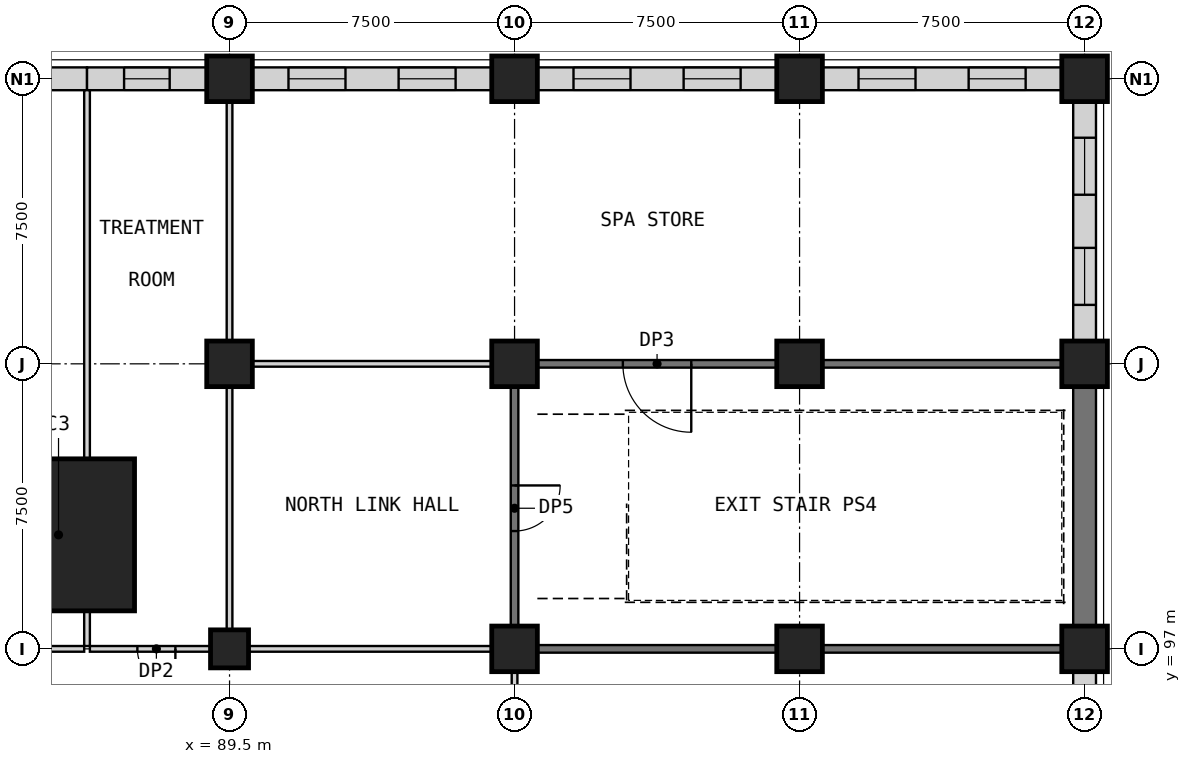
"""IFC4 building model, lengths in metres.
Left out: names, types, materials, properties, quantities, classifications, styles, units other than length and angle.
Written with IfcOpenShell. Run it as: python <this file> out.ifc"""

import sys

from ifc_helpers import new_model, si_unit, direction, frame, frame_2d, origin, origin_2d, place, context, subcontext, project, spatial, rectangle, extrude, element, fill, save


model = new_model("IFC4")
c1 = context("Model", 3, precision=1e-05, world=origin(), true_north=direction((0.0, 1.0)))
c2 = subcontext(c1, "Body", "Model", "MODEL_VIEW")
j1 = project(units=[si_unit("LENGTHUNIT", "METRE"), si_unit("PLANEANGLEUNIT", "RADIAN")], contexts=[c1])
p1 = place(None, origin())
s1 = spatial("IfcSite", under=j1, at=p1, CompositionType="ELEMENT")
p2 = place(p1, origin())
s2 = spatial("IfcBuilding", under=s1, at=p2, CompositionType="ELEMENT")
p3 = place(p2, frame((0.0, 0.0, 29.0)))
s3 = spatial("IfcBuildingStorey", under=s2, at=p3, CompositionType="ELEMENT", Elevation=29.0)
p4 = place(p3, frame((89.5, 97.0, 0.0), z_axis=(0.0, 0.0, 1.0), x_axis=(1.0, 0.0, 0.0)))
e1 = element("IfcColumn", 1, at=p4, inside=s3, PredefinedType="COLUMN", context=c2, shape_type="SweptSolid", body=[
    extrude(rectangle(XDim=1.0, YDim=1.0, at=origin_2d()), origin(), (0.0, 0.0, 1.0), 5.0),
])
p5 = place(p3, frame((85.0, 100.0, 0.0), z_axis=(0.0, 0.0, 1.0), x_axis=(1.0, 0.0, 0.0)))
e2 = element("IfcColumn", 2, at=p5, inside=s3, PredefinedType="COLUMN", context=c2, shape_type="SweptSolid", body=[
    extrude(rectangle(XDim=4.0, YDim=4.0, at=origin_2d()), origin(), (0.0, 0.0, 1.0), 5.0),
])
for number, where, z_axis, x_axis in (
    (3, (89.5, 104.5, 0.0), (0.0, 0.0, 1.0), (1.0, 0.0, 0.0)),
    (4, (89.5, 112.0, 0.0), (0.0, 0.0, 1.0), (1.0, 0.0, 0.0)),
    (5, (97.0, 97.0, 0.0), (0.0, 0.0, 1.0), (1.0, 0.0, 0.0)),
    (6, (97.0, 104.5, 0.0), (0.0, 0.0, 1.0), (1.0, 0.0, 0.0)),
    (7, (97.0, 112.0, 0.0), (0.0, 0.0, 1.0), (1.0, 0.0, 0.0)),
    (8, (104.5, 97.0, 0.0), (0.0, 0.0, 1.0), (1.0, 0.0, 0.0)),
    (9, (104.5, 104.5, 0.0), (0.0, 0.0, 1.0), (1.0, 0.0, 0.0)),
    (10, (104.5, 112.0, 0.0), (0.0, 0.0, 1.0), (1.0, 0.0, 0.0)),
    (11, (112.0, 97.0, 0.0), (0.0, 0.0, 1.0), (1.0, 0.0, 0.0)),
    (12, (112.0, 104.5, 0.0), (0.0, 0.0, 1.0), (1.0, 0.0, 0.0)),
    (13, (112.0, 112.0, 0.0), (0.0, 0.0, 1.0), (1.0, 0.0, 0.0)),
):
    element("IfcColumn", number, at=place(p3, frame(where, z_axis=z_axis, x_axis=x_axis)), inside=s3, PredefinedType="COLUMN", context=c2, shape_type="SweptSolid", body=[
        extrude(rectangle(XDim=1.2, YDim=1.2, at=origin_2d()), origin(), (0.0, 0.0, 1.0), 5.0),
    ])
p6 = place(p3, frame((82.6, 97.0, 0.0), z_axis=(0.0, 0.0, 1.0), x_axis=(1.0, 0.0, 0.0)))
e14 = element("IfcWall", 14, at=p6, inside=s3, PredefinedType="PARTITIONING", context=c2, shape_type="SweptSolid", body=[
    extrude(rectangle(XDim=3.075, YDim=0.15, at=frame_2d((1.538, 0.0))), origin(), (0.0, 0.0, 1.0), 4.7),
])
p7 = place(p3, frame((89.0, 97.0, 0.0), z_axis=(0.0, 0.0, 1.0), x_axis=(-1.0, 0.0, 0.0)))
e15 = element("IfcWall", 15, at=p7, inside=s3, PredefinedType="PARTITIONING", context=c2, shape_type="SweptSolid", body=[
    extrude(rectangle(XDim=3.175, YDim=0.15, at=frame_2d((1.587, 0.0))), origin(), (0.0, 0.0, 1.0), 4.7),
])
p8 = place(p7, frame((0.925, 0.0, 0.0)))
e16 = element("IfcOpeningElement", 16, at=p8, cuts=e15, PredefinedType="OPENING", context=c2, shape_type="SweptSolid", body=[
    extrude(rectangle(XDim=1.0, YDim=2.1, at=frame_2d((0.5, 1.05))), frame((0.0, 0.085, 0.0), z_axis=(0.0, -1.0, 0.0), x_axis=(1.0, 0.0, 0.0)), (0.0, 0.0, 1.0), 0.17),
])
p9 = place(p3, frame((90.0, 97.0, 0.0), z_axis=(0.0, 0.0, 1.0), x_axis=(1.0, 0.0, 0.0)))
e17 = element("IfcWall", 17, at=p9, inside=s3, PredefinedType="PARTITIONING", context=c2, shape_type="SweptSolid", body=[
    extrude(rectangle(XDim=6.4, YDim=0.15, at=frame_2d((3.2, 0.0))), origin(), (0.0, 0.0, 1.0), 4.7),
])
for number, where, z_axis, x_axis in (
    (18, (97.6, 97.0, 0.0), (0.0, 0.0, 1.0), (1.0, 0.0, 0.0)),
    (19, (105.1, 97.0, 0.0), (0.0, 0.0, 1.0), (1.0, 0.0, 0.0)),
):
    element("IfcWall", number, at=place(p3, frame(where, z_axis=z_axis, x_axis=x_axis)), inside=s3, PredefinedType="SHEAR", context=c2, shape_type="SweptSolid", body=[
        extrude(rectangle(XDim=6.3, YDim=0.2, at=frame_2d((3.15, 0.0))), origin(), (0.0, 0.0, 1.0), 4.7),
    ])
p10 = place(p3, frame((82.6, 112.0, 0.0), z_axis=(0.0, 0.0, 1.0), x_axis=(1.0, 0.0, 0.0)))
e20 = element("IfcWall", 20, at=p10, inside=s3, PredefinedType="PARTITIONING", context=c2, shape_type="SweptSolid", body=[
    extrude(rectangle(XDim=3.15, YDim=0.6, at=frame_2d((1.575, 0.0))), origin(), (0.0, 0.0, 1.0), 4.7),
])
p11 = place(p10, frame((0.975, 0.0, 0.9)))
e21 = element("IfcOpeningElement", 21, at=p11, cuts=e20, PredefinedType="OPENING", context=c2, shape_type="SweptSolid", body=[
    extrude(rectangle(XDim=1.2, YDim=2.8, at=frame_2d((0.6, 1.4))), frame((0.0, 0.31, 0.0), z_axis=(0.0, -1.0, 0.0), x_axis=(1.0, 0.0, 0.0)), (0.0, 0.0, 1.0), 0.62),
])
p12 = place(p3, frame((85.75, 112.0, 0.0), z_axis=(0.0, 0.0, 1.0), x_axis=(1.0, 0.0, 0.0)))
e22 = element("IfcWall", 22, at=p12, inside=s3, PredefinedType="PARTITIONING", context=c2, shape_type="SweptSolid", body=[
    extrude(rectangle(XDim=3.15, YDim=0.6, at=frame_2d((1.575, 0.0))), origin(), (0.0, 0.0, 1.0), 4.7),
])
p13 = place(p12, frame((0.975, 0.0, 0.9)))
e23 = element("IfcOpeningElement", 23, at=p13, cuts=e22, PredefinedType="OPENING", context=c2, shape_type="SweptSolid", body=[
    extrude(rectangle(XDim=1.2, YDim=2.8, at=frame_2d((0.6, 1.4))), frame((0.0, 0.31, 0.0), z_axis=(0.0, -1.0, 0.0), x_axis=(1.0, 0.0, 0.0)), (0.0, 0.0, 1.0), 0.62),
])
p14 = place(p3, frame((90.1, 112.0, 0.0), z_axis=(0.0, 0.0, 1.0), x_axis=(1.0, 0.0, 0.0)))
e24 = element("IfcWall", 24, at=p14, inside=s3, PredefinedType="PARTITIONING", context=c2, shape_type="SweptSolid", body=[
    extrude(rectangle(XDim=6.3, YDim=0.6, at=frame_2d((3.15, 0.0))), origin(), (0.0, 0.0, 1.0), 4.7),
])
p15 = place(p14, frame((0.951, 0.0, 0.9)))
e25 = element("IfcOpeningElement", 25, at=p15, cuts=e24, PredefinedType="OPENING", context=c2, shape_type="SweptSolid", body=[
    extrude(rectangle(XDim=1.5, YDim=2.8, at=frame_2d((0.75, 1.4))), frame((0.0, 0.31, 0.0), z_axis=(0.0, -1.0, 0.0), x_axis=(1.0, 0.0, 0.0)), (0.0, 0.0, 1.0), 0.62),
])
p16 = place(p14, frame((3.849, 0.0, 0.9)))
e26 = element("IfcOpeningElement", 26, at=p16, cuts=e24, PredefinedType="OPENING", context=c2, shape_type="SweptSolid", body=[
    extrude(rectangle(XDim=1.5, YDim=2.8, at=frame_2d((0.75, 1.4))), frame((0.0, 0.31, 0.0), z_axis=(0.0, -1.0, 0.0), x_axis=(1.0, 0.0, 0.0)), (0.0, 0.0, 1.0), 0.62),
])
p17 = place(p3, frame((97.6, 112.0, 0.0), z_axis=(0.0, 0.0, 1.0), x_axis=(1.0, 0.0, 0.0)))
e27 = element("IfcWall", 27, at=p17, inside=s3, PredefinedType="PARTITIONING", context=c2, shape_type="SweptSolid", body=[
    extrude(rectangle(XDim=6.3, YDim=0.6, at=frame_2d((3.15, 0.0))), origin(), (0.0, 0.0, 1.0), 4.7),
])
p18 = place(p17, frame((0.951, 0.0, 0.9)))
e28 = element("IfcOpeningElement", 28, at=p18, cuts=e27, PredefinedType="OPENING", context=c2, shape_type="SweptSolid", body=[
    extrude(rectangle(XDim=1.5, YDim=2.8, at=frame_2d((0.75, 1.4))), frame((0.0, 0.31, 0.0), z_axis=(0.0, -1.0, 0.0), x_axis=(1.0, 0.0, 0.0)), (0.0, 0.0, 1.0), 0.62),
])
p19 = place(p17, frame((3.849, 0.0, 0.9)))
e29 = element("IfcOpeningElement", 29, at=p19, cuts=e27, PredefinedType="OPENING", context=c2, shape_type="SweptSolid", body=[
    extrude(rectangle(XDim=1.5, YDim=2.8, at=frame_2d((0.75, 1.4))), frame((0.0, 0.31, 0.0), z_axis=(0.0, -1.0, 0.0), x_axis=(1.0, 0.0, 0.0)), (0.0, 0.0, 1.0), 0.62),
])
p20 = place(p3, frame((105.1, 112.0, 0.0), z_axis=(0.0, 0.0, 1.0), x_axis=(1.0, 0.0, 0.0)))
e30 = element("IfcWall", 30, at=p20, inside=s3, PredefinedType="PARTITIONING", context=c2, shape_type="SweptSolid", body=[
    extrude(rectangle(XDim=6.3, YDim=0.6, at=frame_2d((3.15, 0.0))), origin(), (0.0, 0.0, 1.0), 4.7),
])
p21 = place(p20, frame((0.951, 0.0, 0.9)))
e31 = element("IfcOpeningElement", 31, at=p21, cuts=e30, PredefinedType="OPENING", context=c2, shape_type="SweptSolid", body=[
    extrude(rectangle(XDim=1.5, YDim=2.8, at=frame_2d((0.75, 1.4))), frame((0.0, 0.31, 0.0), z_axis=(0.0, -1.0, 0.0), x_axis=(1.0, 0.0, 0.0)), (0.0, 0.0, 1.0), 0.62),
])
p22 = place(p20, frame((3.849, 0.0, 0.9)))
e32 = element("IfcOpeningElement", 32, at=p22, cuts=e30, PredefinedType="OPENING", context=c2, shape_type="SweptSolid", body=[
    extrude(rectangle(XDim=1.5, YDim=2.8, at=frame_2d((0.75, 1.4))), frame((0.0, 0.31, 0.0), z_axis=(0.0, -1.0, 0.0), x_axis=(1.0, 0.0, 0.0)), (0.0, 0.0, 1.0), 0.62),
])
p23 = place(p3, frame((90.1, 104.5, 0.0), z_axis=(0.0, 0.0, 1.0), x_axis=(1.0, 0.0, 0.0)))
e33 = element("IfcWall", 33, at=p23, inside=s3, PredefinedType="PARTITIONING", context=c2, shape_type="SweptSolid", body=[
    extrude(rectangle(XDim=6.3, YDim=0.15, at=frame_2d((3.15, 0.0))), origin(), (0.0, 0.0, 1.0), 4.7),
])
p24 = place(p3, frame((103.9, 104.5, 0.0), z_axis=(0.0, 0.0, 1.0), x_axis=(-1.0, 0.0, 0.0)))
e34 = element("IfcWall", 34, at=p24, inside=s3, PredefinedType="SHEAR", context=c2, shape_type="SweptSolid", body=[
    extrude(rectangle(XDim=6.3, YDim=0.2, at=frame_2d((3.15, 0.0))), origin(), (0.0, 0.0, 1.0), 4.7),
])
p25 = place(p24, frame((2.25, 0.0, 0.0)))
e35 = element("IfcOpeningElement", 35, at=p25, cuts=e34, PredefinedType="OPENING", context=c2, shape_type="SweptSolid", body=[
    extrude(rectangle(XDim=1.8, YDim=2.4, at=frame_2d((0.9, 1.2))), frame((0.0, 0.11, 0.0), z_axis=(0.0, -1.0, 0.0), x_axis=(1.0, 0.0, 0.0)), (0.0, 0.0, 1.0), 0.22),
])
p26 = place(p3, frame((105.1, 104.5, 0.0), z_axis=(0.0, 0.0, 1.0), x_axis=(1.0, 0.0, 0.0)))
e36 = element("IfcWall", 36, at=p26, inside=s3, PredefinedType="SHEAR", context=c2, shape_type="SweptSolid", body=[
    extrude(rectangle(XDim=6.3, YDim=0.2, at=frame_2d((3.15, 0.0))), origin(), (0.0, 0.0, 1.0), 4.7),
])
p27 = place(p3, frame((97.0, 90.6, 0.0), z_axis=(0.0, 0.0, 1.0), x_axis=(0.0, 1.0, 0.0)))
e37 = element("IfcWall", 37, at=p27, inside=s3, PredefinedType="PARTITIONING", context=c2, shape_type="SweptSolid", body=[
    extrude(rectangle(XDim=5.8, YDim=0.15, at=frame_2d((2.9, 0.0))), origin(), (0.0, 0.0, 1.0), 4.7),
])
p28 = place(p3, frame((97.0, 103.9, 0.0), z_axis=(0.0, 0.0, 1.0), x_axis=(0.0, -1.0, 0.0)))
e38 = element("IfcWall", 38, at=p28, inside=s3, PredefinedType="SHEAR", context=c2, shape_type="SweptSolid", body=[
    extrude(rectangle(XDim=6.3, YDim=0.2, at=frame_2d((3.15, 0.0))), origin(), (0.0, 0.0, 1.0), 4.7),
])
p29 = place(p28, frame((2.6, 0.0, 0.0)))
e39 = element("IfcOpeningElement", 39, at=p29, cuts=e38, PredefinedType="OPENING", context=c2, shape_type="SweptSolid", body=[
    extrude(rectangle(XDim=1.2, YDim=2.1, at=frame_2d((0.6, 1.05))), frame((0.0, 0.11, 0.0), z_axis=(0.0, -1.0, 0.0), x_axis=(1.0, 0.0, 0.0)), (0.0, 0.0, 1.0), 0.22),
])
p30 = place(p3, frame((112.0, 90.6, 0.0), z_axis=(0.0, 0.0, 1.0), x_axis=(0.0, 1.0, 0.0)))
e40 = element("IfcWall", 40, at=p30, inside=s3, PredefinedType="PARTITIONING", context=c2, shape_type="SweptSolid", body=[
    extrude(rectangle(XDim=5.8, YDim=0.6, at=frame_2d((2.9, 0.0))), origin(), (0.0, 0.0, 1.0), 4.7),
])
p31 = place(p30, frame((0.816, 0.0, 0.9)))
e41 = element("IfcOpeningElement", 41, at=p31, cuts=e40, PredefinedType="OPENING", context=c2, shape_type="SweptSolid", body=[
    extrude(rectangle(XDim=1.5, YDim=2.8, at=frame_2d((0.75, 1.4))), frame((0.0, 0.31, 0.0), z_axis=(0.0, -1.0, 0.0), x_axis=(1.0, 0.0, 0.0)), (0.0, 0.0, 1.0), 0.62),
])
p32 = place(p30, frame((3.484, 0.0, 0.9)))
e42 = element("IfcOpeningElement", 42, at=p32, cuts=e40, PredefinedType="OPENING", context=c2, shape_type="SweptSolid", body=[
    extrude(rectangle(XDim=1.5, YDim=2.8, at=frame_2d((0.75, 1.4))), frame((0.0, 0.31, 0.0), z_axis=(0.0, -1.0, 0.0), x_axis=(1.0, 0.0, 0.0)), (0.0, 0.0, 1.0), 0.62),
])
p33 = place(p3, frame((112.0, 97.6, 0.0), z_axis=(0.0, 0.0, 1.0), x_axis=(0.0, 1.0, 0.0)))
e43 = element("IfcWall", 43, at=p33, inside=s3, PredefinedType="PARTITIONING", context=c2, shape_type="SweptSolid", body=[
    extrude(rectangle(XDim=6.3, YDim=0.6, at=frame_2d((3.15, 0.0))), origin(), (0.0, 0.0, 1.0), 4.7),
])
p34 = place(p3, frame((112.0, 105.1, 0.0), z_axis=(0.0, 0.0, 1.0), x_axis=(0.0, 1.0, 0.0)))
e44 = element("IfcWall", 44, at=p34, inside=s3, PredefinedType="PARTITIONING", context=c2, shape_type="SweptSolid", body=[
    extrude(rectangle(XDim=6.3, YDim=0.6, at=frame_2d((3.15, 0.0))), origin(), (0.0, 0.0, 1.0), 4.7),
])
p35 = place(p34, frame((0.951, 0.0, 0.9)))
e45 = element("IfcOpeningElement", 45, at=p35, cuts=e44, PredefinedType="OPENING", context=c2, shape_type="SweptSolid", body=[
    extrude(rectangle(XDim=1.5, YDim=2.8, at=frame_2d((0.75, 1.4))), frame((0.0, 0.31, 0.0), z_axis=(0.0, -1.0, 0.0), x_axis=(1.0, 0.0, 0.0)), (0.0, 0.0, 1.0), 0.62),
])
p36 = place(p34, frame((3.849, 0.0, 0.9)))
e46 = element("IfcOpeningElement", 46, at=p36, cuts=e44, PredefinedType="OPENING", context=c2, shape_type="SweptSolid", body=[
    extrude(rectangle(XDim=1.5, YDim=2.8, at=frame_2d((0.75, 1.4))), frame((0.0, 0.31, 0.0), z_axis=(0.0, -1.0, 0.0), x_axis=(1.0, 0.0, 0.0)), (0.0, 0.0, 1.0), 0.62),
])
p37 = place(p3, frame((89.5, 97.5, 0.0), z_axis=(0.0, 0.0, 1.0), x_axis=(0.0, 1.0, 0.0)))
e47 = element("IfcWall", 47, at=p37, inside=s3, PredefinedType="PARTITIONING", context=c2, shape_type="SweptSolid", body=[
    extrude(rectangle(XDim=6.4, YDim=0.15, at=frame_2d((3.2, 0.0))), origin(), (0.0, 0.0, 1.0), 4.7),
])
p38 = place(p3, frame((89.5, 105.1, 0.0), z_axis=(0.0, 0.0, 1.0), x_axis=(0.0, 1.0, 0.0)))
e48 = element("IfcWall", 48, at=p38, inside=s3, PredefinedType="PARTITIONING", context=c2, shape_type="SweptSolid", body=[
    extrude(rectangle(XDim=6.3, YDim=0.15, at=frame_2d((3.15, 0.0))), origin(), (0.0, 0.0, 1.0), 4.7),
])
p39 = place(p3, frame((85.75, 97.075, 0.0), z_axis=(0.0, 0.0, 1.0), x_axis=(0.0, 1.0, 0.0)))
e49 = element("IfcWall", 49, at=p39, inside=s3, PredefinedType="PARTITIONING", context=c2, shape_type="SweptSolid", body=[
    extrude(rectangle(XDim=0.925, YDim=0.15, at=frame_2d((0.462, 0.0))), origin(), (0.0, 0.0, 1.0), 4.7),
])
p40 = place(p3, frame((85.75, 102.0, 0.0), z_axis=(0.0, 0.0, 1.0), x_axis=(0.0, 1.0, 0.0)))
e50 = element("IfcWall", 50, at=p40, inside=s3, PredefinedType="PARTITIONING", context=c2, shape_type="SweptSolid", body=[
    extrude(rectangle(XDim=9.7, YDim=0.15, at=frame_2d((4.85, 0.0))), origin(), (0.0, 0.0, 1.0), 4.7),
])
p41 = place(p8, origin())
e51 = element("IfcDoor", 51, at=p41, inside=s3, OperationType="SINGLE_SWING_LEFT", PredefinedType="DOOR", context=c2, shape_type="SweptSolid", body=[
    extrude(rectangle(XDim=1.0, YDim=2.1, at=frame_2d((0.5, 1.05))), frame((0.0, 0.025, 0.0), z_axis=(0.0, -1.0, 0.0), x_axis=(1.0, 0.0, 0.0)), (0.0, 0.0, 1.0), 0.05),
])
fill(e16, e51)
p42 = place(p13, origin())
e52 = element("IfcWindow", 52, at=p42, inside=s3, PartitioningType="SINGLE_PANEL", PredefinedType="WINDOW", context=c2, shape_type="SweptSolid", body=[
    extrude(rectangle(XDim=1.2, YDim=2.8, at=frame_2d((0.6, 1.4))), frame((0.0, 0.03, 0.0), z_axis=(0.0, -1.0, 0.0), x_axis=(1.0, 0.0, 0.0)), (0.0, 0.0, 1.0), 0.06),
])
fill(e23, e52)
p43 = place(p15, origin())
e53 = element("IfcWindow", 53, at=p43, inside=s3, PartitioningType="SINGLE_PANEL", PredefinedType="WINDOW", context=c2, shape_type="SweptSolid", body=[
    extrude(rectangle(XDim=1.5, YDim=2.8, at=frame_2d((0.75, 1.4))), frame((0.0, 0.03, 0.0), z_axis=(0.0, -1.0, 0.0), x_axis=(1.0, 0.0, 0.0)), (0.0, 0.0, 1.0), 0.06),
])
fill(e25, e53)
p44 = place(p16, origin())
e54 = element("IfcWindow", 54, at=p44, inside=s3, PartitioningType="SINGLE_PANEL", PredefinedType="WINDOW", context=c2, shape_type="SweptSolid", body=[
    extrude(rectangle(XDim=1.5, YDim=2.8, at=frame_2d((0.75, 1.4))), frame((0.0, 0.03, 0.0), z_axis=(0.0, -1.0, 0.0), x_axis=(1.0, 0.0, 0.0)), (0.0, 0.0, 1.0), 0.06),
])
fill(e26, e54)
p45 = place(p18, origin())
e55 = element("IfcWindow", 55, at=p45, inside=s3, PartitioningType="SINGLE_PANEL", PredefinedType="WINDOW", context=c2, shape_type="SweptSolid", body=[
    extrude(rectangle(XDim=1.5, YDim=2.8, at=frame_2d((0.75, 1.4))), frame((0.0, 0.03, 0.0), z_axis=(0.0, -1.0, 0.0), x_axis=(1.0, 0.0, 0.0)), (0.0, 0.0, 1.0), 0.06),
])
fill(e28, e55)
p46 = place(p19, origin())
e56 = element("IfcWindow", 56, at=p46, inside=s3, PartitioningType="SINGLE_PANEL", PredefinedType="WINDOW", context=c2, shape_type="SweptSolid", body=[
    extrude(rectangle(XDim=1.5, YDim=2.8, at=frame_2d((0.75, 1.4))), frame((0.0, 0.03, 0.0), z_axis=(0.0, -1.0, 0.0), x_axis=(1.0, 0.0, 0.0)), (0.0, 0.0, 1.0), 0.06),
])
fill(e29, e56)
p47 = place(p21, origin())
e57 = element("IfcWindow", 57, at=p47, inside=s3, PartitioningType="SINGLE_PANEL", PredefinedType="WINDOW", context=c2, shape_type="SweptSolid", body=[
    extrude(rectangle(XDim=1.5, YDim=2.8, at=frame_2d((0.75, 1.4))), frame((0.0, 0.03, 0.0), z_axis=(0.0, -1.0, 0.0), x_axis=(1.0, 0.0, 0.0)), (0.0, 0.0, 1.0), 0.06),
])
fill(e31, e57)
p48 = place(p22, origin())
e58 = element("IfcWindow", 58, at=p48, inside=s3, PartitioningType="SINGLE_PANEL", PredefinedType="WINDOW", context=c2, shape_type="SweptSolid", body=[
    extrude(rectangle(XDim=1.5, YDim=2.8, at=frame_2d((0.75, 1.4))), frame((0.0, 0.03, 0.0), z_axis=(0.0, -1.0, 0.0), x_axis=(1.0, 0.0, 0.0)), (0.0, 0.0, 1.0), 0.06),
])
fill(e32, e58)
p49 = place(p25, origin())
e59 = element("IfcDoor", 59, at=p49, inside=s3, OperationType="SINGLE_SWING_LEFT", PredefinedType="DOOR", context=c2, shape_type="SweptSolid", body=[
    extrude(rectangle(XDim=1.8, YDim=2.4, at=frame_2d((0.9, 1.2))), frame((0.0, 0.025, 0.0), z_axis=(0.0, -1.0, 0.0), x_axis=(1.0, 0.0, 0.0)), (0.0, 0.0, 1.0), 0.05),
])
fill(e35, e59)
p50 = place(p29, origin())
e60 = element("IfcDoor", 60, at=p50, inside=s3, OperationType="SINGLE_SWING_LEFT", PredefinedType="DOOR", context=c2, shape_type="SweptSolid", body=[
    extrude(rectangle(XDim=1.2, YDim=2.1, at=frame_2d((0.6, 1.05))), frame((0.0, 0.025, 0.0), z_axis=(0.0, -1.0, 0.0), x_axis=(1.0, 0.0, 0.0)), (0.0, 0.0, 1.0), 0.05),
])
fill(e39, e60)
p51 = place(p35, origin())
e61 = element("IfcWindow", 61, at=p51, inside=s3, PartitioningType="SINGLE_PANEL", PredefinedType="WINDOW", context=c2, shape_type="SweptSolid", body=[
    extrude(rectangle(XDim=1.5, YDim=2.8, at=frame_2d((0.75, 1.4))), frame((0.0, 0.03, 0.0), z_axis=(0.0, -1.0, 0.0), x_axis=(1.0, 0.0, 0.0)), (0.0, 0.0, 1.0), 0.06),
])
fill(e45, e61)
p52 = place(p36, origin())
e62 = element("IfcWindow", 62, at=p52, inside=s3, PartitioningType="SINGLE_PANEL", PredefinedType="WINDOW", context=c2, shape_type="SweptSolid", body=[
    extrude(rectangle(XDim=1.5, YDim=2.8, at=frame_2d((0.75, 1.4))), frame((0.0, 0.03, 0.0), z_axis=(0.0, -1.0, 0.0), x_axis=(1.0, 0.0, 0.0)), (0.0, 0.0, 1.0), 0.06),
])
fill(e46, e62)
save(model, sys.argv[1])
